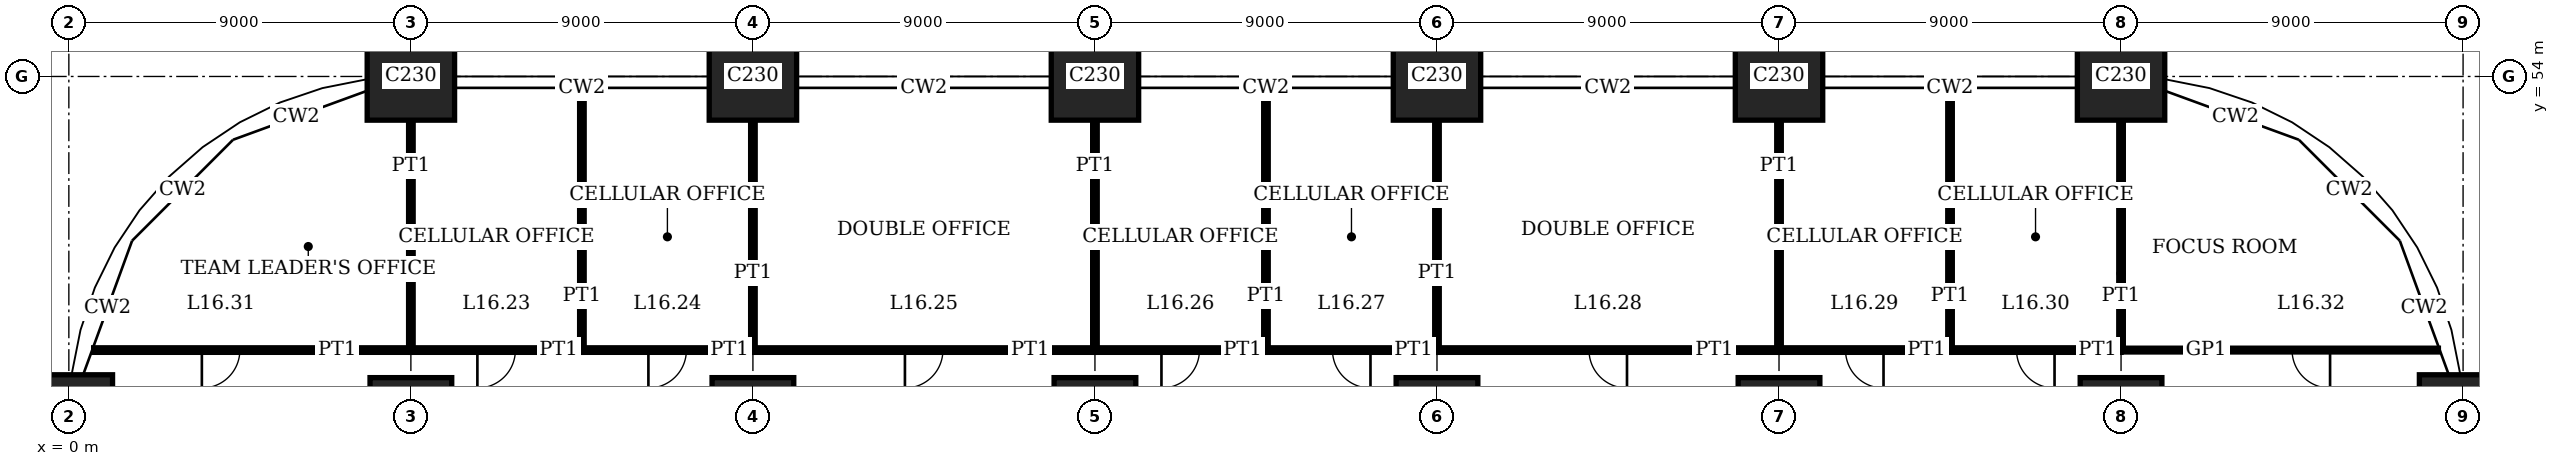
"""IFC4 building model, lengths in metres.
Left out: names, types, materials, properties, quantities, classifications, styles, units other than length and angle.
Written with IfcOpenShell. Run it as: python <this file> out.ifc"""

import sys

from ifc_helpers import new_model, si_unit, direction, frame, frame_2d, origin, origin_2d, place, context, subcontext, project, spatial, rectangle, extrude, element, fill, save


model = new_model("IFC4")
c1 = context("Model", 3, precision=1e-05, world=origin(), true_north=direction((0.0, 1.0)))
c2 = subcontext(c1, "Body", "Model", "MODEL_VIEW")
j1 = project(units=[si_unit("LENGTHUNIT", "METRE"), si_unit("PLANEANGLEUNIT", "RADIAN")], contexts=[c1])
p1 = place(None, origin())
s1 = spatial("IfcSite", under=j1, at=p1, CompositionType="ELEMENT")
p2 = place(p1, origin())
s2 = spatial("IfcBuilding", under=s1, at=p2, CompositionType="ELEMENT")
p3 = place(p2, frame((0.0, 0.0, 67.8)))
s3 = spatial("IfcBuildingStorey", under=s2, at=p3, CompositionType="ELEMENT", Elevation=67.8)
p4 = place(p3, frame((0.0, 45.0, 0.0), z_axis=(0.0, 0.0, 1.0), x_axis=(1.0, 0.0, 0.0)))
e1 = element("IfcColumn", 1, at=p4, inside=s3, PredefinedType="COLUMN", context=c2, shape_type="SweptSolid", body=[
    extrude(rectangle(XDim=2.3, YDim=2.3, at=origin_2d()), origin(), (0.0, 0.0, 1.0), 4.0),
])
p5 = place(p3, frame((9.0, 45.0, 0.0), z_axis=(0.0, 0.0, 1.0), x_axis=(1.0, 0.0, 0.0)))
e2 = element("IfcColumn", 2, at=p5, inside=s3, PredefinedType="COLUMN", context=c2, shape_type="SweptSolid", body=[
    extrude(rectangle(XDim=2.15, YDim=2.15, at=origin_2d()), origin(), (0.0, 0.0, 1.0), 4.0),
])
p6 = place(p3, frame((9.0, 54.0, 0.0), z_axis=(0.0, 0.0, 1.0), x_axis=(1.0, 0.0, 0.0)))
e3 = element("IfcColumn", 3, at=p6, inside=s3, PredefinedType="COLUMN", context=c2, shape_type="SweptSolid", body=[
    extrude(rectangle(XDim=2.3, YDim=2.3, at=origin_2d()), origin(), (0.0, 0.0, 1.0), 4.0),
])
p7 = place(p3, frame((18.0, 45.0, 0.0), z_axis=(0.0, 0.0, 1.0), x_axis=(1.0, 0.0, 0.0)))
e4 = element("IfcColumn", 4, at=p7, inside=s3, PredefinedType="COLUMN", context=c2, shape_type="SweptSolid", body=[
    extrude(rectangle(XDim=2.15, YDim=2.15, at=origin_2d()), origin(), (0.0, 0.0, 1.0), 4.0),
])
p8 = place(p3, frame((18.0, 54.0, 0.0), z_axis=(0.0, 0.0, 1.0), x_axis=(1.0, 0.0, 0.0)))
e5 = element("IfcColumn", 5, at=p8, inside=s3, PredefinedType="COLUMN", context=c2, shape_type="SweptSolid", body=[
    extrude(rectangle(XDim=2.3, YDim=2.3, at=origin_2d()), origin(), (0.0, 0.0, 1.0), 4.0),
])
p9 = place(p3, frame((27.0, 45.0, 0.0), z_axis=(0.0, 0.0, 1.0), x_axis=(1.0, 0.0, 0.0)))
e6 = element("IfcColumn", 6, at=p9, inside=s3, PredefinedType="COLUMN", context=c2, shape_type="SweptSolid", body=[
    extrude(rectangle(XDim=2.15, YDim=2.15, at=origin_2d()), origin(), (0.0, 0.0, 1.0), 4.0),
])
p10 = place(p3, frame((27.0, 54.0, 0.0), z_axis=(0.0, 0.0, 1.0), x_axis=(1.0, 0.0, 0.0)))
e7 = element("IfcColumn", 7, at=p10, inside=s3, PredefinedType="COLUMN", context=c2, shape_type="SweptSolid", body=[
    extrude(rectangle(XDim=2.3, YDim=2.3, at=origin_2d()), origin(), (0.0, 0.0, 1.0), 4.0),
])
p11 = place(p3, frame((36.0, 45.0, 0.0), z_axis=(0.0, 0.0, 1.0), x_axis=(1.0, 0.0, 0.0)))
e8 = element("IfcColumn", 8, at=p11, inside=s3, PredefinedType="COLUMN", context=c2, shape_type="SweptSolid", body=[
    extrude(rectangle(XDim=2.15, YDim=2.15, at=origin_2d()), origin(), (0.0, 0.0, 1.0), 4.0),
])
p12 = place(p3, frame((36.0, 54.0, 0.0), z_axis=(0.0, 0.0, 1.0), x_axis=(1.0, 0.0, 0.0)))
e9 = element("IfcColumn", 9, at=p12, inside=s3, PredefinedType="COLUMN", context=c2, shape_type="SweptSolid", body=[
    extrude(rectangle(XDim=2.3, YDim=2.3, at=origin_2d()), origin(), (0.0, 0.0, 1.0), 4.0),
])
p13 = place(p3, frame((45.0, 45.0, 0.0), z_axis=(0.0, 0.0, 1.0), x_axis=(1.0, 0.0, 0.0)))
e10 = element("IfcColumn", 10, at=p13, inside=s3, PredefinedType="COLUMN", context=c2, shape_type="SweptSolid", body=[
    extrude(rectangle(XDim=2.15, YDim=2.15, at=origin_2d()), origin(), (0.0, 0.0, 1.0), 4.0),
])
p14 = place(p3, frame((45.0, 54.0, 0.0), z_axis=(0.0, 0.0, 1.0), x_axis=(1.0, 0.0, 0.0)))
e11 = element("IfcColumn", 11, at=p14, inside=s3, PredefinedType="COLUMN", context=c2, shape_type="SweptSolid", body=[
    extrude(rectangle(XDim=2.3, YDim=2.3, at=origin_2d()), origin(), (0.0, 0.0, 1.0), 4.0),
])
p15 = place(p3, frame((54.0, 45.0, 0.0), z_axis=(0.0, 0.0, 1.0), x_axis=(1.0, 0.0, 0.0)))
e12 = element("IfcColumn", 12, at=p15, inside=s3, PredefinedType="COLUMN", context=c2, shape_type="SweptSolid", body=[
    extrude(rectangle(XDim=2.15, YDim=2.15, at=origin_2d()), origin(), (0.0, 0.0, 1.0), 4.0),
])
for number, where, z_axis, x_axis in (
    (13, (54.0, 54.0, 0.0), (0.0, 0.0, 1.0), (1.0, 0.0, 0.0)),
    (14, (63.0, 45.0, 0.0), (0.0, 0.0, 1.0), (1.0, 0.0, 0.0)),
):
    element("IfcColumn", number, at=place(p3, frame(where, z_axis=z_axis, x_axis=x_axis)), inside=s3, PredefinedType="COLUMN", context=c2, shape_type="SweptSolid", body=[
        extrude(rectangle(XDim=2.3, YDim=2.3, at=origin_2d()), origin(), (0.0, 0.0, 1.0), 4.0),
    ])
p16 = place(p3, frame((9.0, 46.8, 0.0), z_axis=(0.0, 0.0, 1.0), x_axis=(1.0, 0.0, 0.0)))
e15 = element("IfcWall", 15, at=p16, inside=s3, PredefinedType="PARTITIONING", context=c2, shape_type="SweptSolid", body=[
    extrude(rectangle(XDim=4.5, YDim=0.12, at=frame_2d((2.25, 0.0))), origin(), (0.0, 0.0, 1.0), 3.75),
])
p17 = place(p16, frame((1.75, 0.0, 0.0)))
e16 = element("IfcOpeningElement", 16, at=p17, cuts=e15, PredefinedType="OPENING", context=c2, shape_type="SweptSolid", body=[
    extrude(rectangle(XDim=1.0, YDim=2.4, at=frame_2d((0.5, 1.2))), frame((0.0, 0.07, 0.0), z_axis=(0.0, -1.0, 0.0), x_axis=(1.0, 0.0, 0.0)), (0.0, 0.0, 1.0), 0.14),
])
p18 = place(p3, frame((13.5, 46.8, 0.0), z_axis=(0.0, 0.0, 1.0), x_axis=(1.0, 0.0, 0.0)))
e17 = element("IfcWall", 17, at=p18, inside=s3, PredefinedType="PARTITIONING", context=c2, shape_type="SweptSolid", body=[
    extrude(rectangle(XDim=4.5, YDim=0.12, at=frame_2d((2.25, 0.0))), origin(), (0.0, 0.0, 1.0), 3.75),
])
p19 = place(p18, frame((1.75, 0.0, 0.0)))
e18 = element("IfcOpeningElement", 18, at=p19, cuts=e17, PredefinedType="OPENING", context=c2, shape_type="SweptSolid", body=[
    extrude(rectangle(XDim=1.0, YDim=2.4, at=frame_2d((0.5, 1.2))), frame((0.0, 0.07, 0.0), z_axis=(0.0, -1.0, 0.0), x_axis=(1.0, 0.0, 0.0)), (0.0, 0.0, 1.0), 0.14),
])
p20 = place(p3, frame((18.0, 46.8, 0.0), z_axis=(0.0, 0.0, 1.0), x_axis=(1.0, 0.0, 0.0)))
e19 = element("IfcWall", 19, at=p20, inside=s3, PredefinedType="PARTITIONING", context=c2, shape_type="SweptSolid", body=[
    extrude(rectangle(XDim=9.0, YDim=0.12, at=frame_2d((4.5, 0.0))), origin(), (0.0, 0.0, 1.0), 3.75),
])
p21 = place(p20, frame((4.0, 0.0, 0.0)))
e20 = element("IfcOpeningElement", 20, at=p21, cuts=e19, PredefinedType="OPENING", context=c2, shape_type="SweptSolid", body=[
    extrude(rectangle(XDim=1.0, YDim=2.4, at=frame_2d((0.5, 1.2))), frame((0.0, 0.07, 0.0), z_axis=(0.0, -1.0, 0.0), x_axis=(1.0, 0.0, 0.0)), (0.0, 0.0, 1.0), 0.14),
])
p22 = place(p3, frame((27.0, 46.8, 0.0), z_axis=(0.0, 0.0, 1.0), x_axis=(1.0, 0.0, 0.0)))
e21 = element("IfcWall", 21, at=p22, inside=s3, PredefinedType="PARTITIONING", context=c2, shape_type="SweptSolid", body=[
    extrude(rectangle(XDim=4.5, YDim=0.12, at=frame_2d((2.25, 0.0))), origin(), (0.0, 0.0, 1.0), 3.75),
])
p23 = place(p22, frame((1.75, 0.0, 0.0)))
e22 = element("IfcOpeningElement", 22, at=p23, cuts=e21, PredefinedType="OPENING", context=c2, shape_type="SweptSolid", body=[
    extrude(rectangle(XDim=1.0, YDim=2.4, at=frame_2d((0.5, 1.2))), frame((0.0, 0.07, 0.0), z_axis=(0.0, -1.0, 0.0), x_axis=(1.0, 0.0, 0.0)), (0.0, 0.0, 1.0), 0.14),
])
p24 = place(p3, frame((31.5, 46.8, 0.0), z_axis=(0.0, 0.0, 1.0), x_axis=(1.0, 0.0, 0.0)))
e23 = element("IfcWall", 23, at=p24, inside=s3, PredefinedType="PARTITIONING", context=c2, shape_type="SweptSolid", body=[
    extrude(rectangle(XDim=4.5, YDim=0.12, at=frame_2d((2.25, 0.0))), origin(), (0.0, 0.0, 1.0), 3.75),
])
p25 = place(p24, frame((1.75, 0.0, 0.0)))
e24 = element("IfcOpeningElement", 24, at=p25, cuts=e23, PredefinedType="OPENING", context=c2, shape_type="SweptSolid", body=[
    extrude(rectangle(XDim=1.0, YDim=2.4, at=frame_2d((0.5, 1.2))), frame((0.0, 0.07, 0.0), z_axis=(0.0, -1.0, 0.0), x_axis=(1.0, 0.0, 0.0)), (0.0, 0.0, 1.0), 0.14),
])
p26 = place(p3, frame((36.0, 46.8, 0.0), z_axis=(0.0, 0.0, 1.0), x_axis=(1.0, 0.0, 0.0)))
e25 = element("IfcWall", 25, at=p26, inside=s3, PredefinedType="PARTITIONING", context=c2, shape_type="SweptSolid", body=[
    extrude(rectangle(XDim=9.0, YDim=0.12, at=frame_2d((4.5, 0.0))), origin(), (0.0, 0.0, 1.0), 3.75),
])
p27 = place(p26, frame((4.0, 0.0, 0.0)))
e26 = element("IfcOpeningElement", 26, at=p27, cuts=e25, PredefinedType="OPENING", context=c2, shape_type="SweptSolid", body=[
    extrude(rectangle(XDim=1.0, YDim=2.4, at=frame_2d((0.5, 1.2))), frame((0.0, 0.07, 0.0), z_axis=(0.0, -1.0, 0.0), x_axis=(1.0, 0.0, 0.0)), (0.0, 0.0, 1.0), 0.14),
])
p28 = place(p3, frame((45.0, 46.8, 0.0), z_axis=(0.0, 0.0, 1.0), x_axis=(1.0, 0.0, 0.0)))
e27 = element("IfcWall", 27, at=p28, inside=s3, PredefinedType="PARTITIONING", context=c2, shape_type="SweptSolid", body=[
    extrude(rectangle(XDim=4.5, YDim=0.12, at=frame_2d((2.25, 0.0))), origin(), (0.0, 0.0, 1.0), 3.75),
])
p29 = place(p28, frame((1.75, 0.0, 0.0)))
e28 = element("IfcOpeningElement", 28, at=p29, cuts=e27, PredefinedType="OPENING", context=c2, shape_type="SweptSolid", body=[
    extrude(rectangle(XDim=1.0, YDim=2.4, at=frame_2d((0.5, 1.2))), frame((0.0, 0.07, 0.0), z_axis=(0.0, -1.0, 0.0), x_axis=(1.0, 0.0, 0.0)), (0.0, 0.0, 1.0), 0.14),
])
p30 = place(p3, frame((49.5, 46.8, 0.0), z_axis=(0.0, 0.0, 1.0), x_axis=(1.0, 0.0, 0.0)))
e29 = element("IfcWall", 29, at=p30, inside=s3, PredefinedType="PARTITIONING", context=c2, shape_type="SweptSolid", body=[
    extrude(rectangle(XDim=4.5, YDim=0.12, at=frame_2d((2.25, 0.0))), origin(), (0.0, 0.0, 1.0), 3.75),
])
p31 = place(p30, frame((1.75, 0.0, 0.0)))
e30 = element("IfcOpeningElement", 30, at=p31, cuts=e29, PredefinedType="OPENING", context=c2, shape_type="SweptSolid", body=[
    extrude(rectangle(XDim=1.0, YDim=2.4, at=frame_2d((0.5, 1.2))), frame((0.0, 0.07, 0.0), z_axis=(0.0, -1.0, 0.0), x_axis=(1.0, 0.0, 0.0)), (0.0, 0.0, 1.0), 0.14),
])
p32 = place(p3, frame((0.653, 46.8, 0.0), z_axis=(0.0, 0.0, 1.0), x_axis=(1.0, 0.0, 0.0)))
e31 = element("IfcWall", 31, at=p32, inside=s3, PredefinedType="PARTITIONING", context=c2, shape_type="SweptSolid", body=[
    extrude(rectangle(XDim=8.347, YDim=0.12, at=frame_2d((4.174, 0.0))), origin(), (0.0, 0.0, 1.0), 3.75),
])
p33 = place(p32, frame((2.847, 0.0, 0.0)))
e32 = element("IfcOpeningElement", 32, at=p33, cuts=e31, PredefinedType="OPENING", context=c2, shape_type="SweptSolid", body=[
    extrude(rectangle(XDim=1.0, YDim=2.4, at=frame_2d((0.5, 1.2))), frame((0.0, 0.07, 0.0), z_axis=(0.0, -1.0, 0.0), x_axis=(1.0, 0.0, 0.0)), (0.0, 0.0, 1.0), 0.14),
])
p34 = place(p3, frame((54.0, 46.8, 0.0), z_axis=(0.0, 0.0, 1.0), x_axis=(1.0, 0.0, 0.0)))
e33 = element("IfcWall", 33, at=p34, inside=s3, PredefinedType="PARTITIONING", context=c2, shape_type="SweptSolid", body=[
    extrude(rectangle(XDim=8.351, YDim=0.1, at=frame_2d((4.175, 0.0))), origin(), (0.0, 0.0, 1.0), 3.75),
])
p35 = place(p34, frame((4.5, 0.0, 0.0)))
e34 = element("IfcOpeningElement", 34, at=p35, cuts=e33, PredefinedType="OPENING", context=c2, shape_type="SweptSolid", body=[
    extrude(rectangle(XDim=1.0, YDim=2.4, at=frame_2d((0.5, 1.2))), frame((0.0, 0.06, 0.0), z_axis=(0.0, -1.0, 0.0), x_axis=(1.0, 0.0, 0.0)), (0.0, 0.0, 1.0), 0.12),
])
p36 = place(p3, frame((9.0, 46.8, 0.0), z_axis=(0.0, 0.0, 1.0), x_axis=(0.0, 1.0, 0.0)))
e35 = element("IfcWall", 35, at=p36, inside=s3, PredefinedType="PARTITIONING", context=c2, shape_type="SweptSolid", body=[
    extrude(rectangle(XDim=6.05, YDim=0.12, at=frame_2d((3.025, 0.0))), origin(), (0.0, 0.0, 1.0), 3.05),
])
p37 = place(p3, frame((13.5, 46.8, 0.0), z_axis=(0.0, 0.0, 1.0), x_axis=(0.0, 1.0, 0.0)))
e36 = element("IfcWall", 36, at=p37, inside=s3, PredefinedType="PARTITIONING", context=c2, shape_type="SweptSolid", body=[
    extrude(rectangle(XDim=6.89, YDim=0.12, at=frame_2d((3.445, 0.0))), origin(), (0.0, 0.0, 1.0), 3.75),
])
for number, where, z_axis, x_axis in (
    (37, (18.0, 46.8, 0.0), (0.0, 0.0, 1.0), (0.0, 1.0, 0.0)),
    (38, (27.0, 46.8, 0.0), (0.0, 0.0, 1.0), (0.0, 1.0, 0.0)),
):
    element("IfcWall", number, at=place(p3, frame(where, z_axis=z_axis, x_axis=x_axis)), inside=s3, PredefinedType="PARTITIONING", context=c2, shape_type="SweptSolid", body=[
        extrude(rectangle(XDim=6.05, YDim=0.12, at=frame_2d((3.025, 0.0))), origin(), (0.0, 0.0, 1.0), 3.05),
    ])
p38 = place(p3, frame((31.5, 46.8, 0.0), z_axis=(0.0, 0.0, 1.0), x_axis=(0.0, 1.0, 0.0)))
e39 = element("IfcWall", 39, at=p38, inside=s3, PredefinedType="PARTITIONING", context=c2, shape_type="SweptSolid", body=[
    extrude(rectangle(XDim=6.89, YDim=0.12, at=frame_2d((3.445, 0.0))), origin(), (0.0, 0.0, 1.0), 3.75),
])
for number, where, z_axis, x_axis in (
    (40, (36.0, 46.8, 0.0), (0.0, 0.0, 1.0), (0.0, 1.0, 0.0)),
    (41, (45.0, 46.8, 0.0), (0.0, 0.0, 1.0), (0.0, 1.0, 0.0)),
):
    element("IfcWall", number, at=place(p3, frame(where, z_axis=z_axis, x_axis=x_axis)), inside=s3, PredefinedType="PARTITIONING", context=c2, shape_type="SweptSolid", body=[
        extrude(rectangle(XDim=6.05, YDim=0.12, at=frame_2d((3.025, 0.0))), origin(), (0.0, 0.0, 1.0), 3.05),
    ])
p39 = place(p3, frame((49.5, 46.8, 0.0), z_axis=(0.0, 0.0, 1.0), x_axis=(0.0, 1.0, 0.0)))
e42 = element("IfcWall", 42, at=p39, inside=s3, PredefinedType="PARTITIONING", context=c2, shape_type="SweptSolid", body=[
    extrude(rectangle(XDim=6.89, YDim=0.12, at=frame_2d((3.445, 0.0))), origin(), (0.0, 0.0, 1.0), 3.75),
])
p40 = place(p3, frame((54.0, 46.8, 0.0), z_axis=(0.0, 0.0, 1.0), x_axis=(0.0, 1.0, 0.0)))
e43 = element("IfcWall", 43, at=p40, inside=s3, PredefinedType="PARTITIONING", context=c2, shape_type="SweptSolid", body=[
    extrude(rectangle(XDim=6.05, YDim=0.12, at=frame_2d((3.025, 0.0))), origin(), (0.0, 0.0, 1.0), 3.05),
])
p41 = place(p17, origin())
e44 = element("IfcDoor", 44, at=p41, inside=s3, OperationType="SINGLE_SWING_LEFT", PredefinedType="DOOR", context=c2, shape_type="SweptSolid", body=[
    extrude(rectangle(XDim=1.0, YDim=2.4, at=frame_2d((0.5, 1.2))), frame((0.0, 0.025, 0.0), z_axis=(0.0, -1.0, 0.0), x_axis=(1.0, 0.0, 0.0)), (0.0, 0.0, 1.0), 0.05),
])
fill(e16, e44)
p42 = place(p19, origin())
e45 = element("IfcDoor", 45, at=p42, inside=s3, OperationType="SINGLE_SWING_LEFT", PredefinedType="DOOR", context=c2, shape_type="SweptSolid", body=[
    extrude(rectangle(XDim=1.0, YDim=2.4, at=frame_2d((0.5, 1.2))), frame((0.0, 0.025, 0.0), z_axis=(0.0, -1.0, 0.0), x_axis=(1.0, 0.0, 0.0)), (0.0, 0.0, 1.0), 0.05),
])
fill(e18, e45)
p43 = place(p21, origin())
e46 = element("IfcDoor", 46, at=p43, inside=s3, OperationType="SINGLE_SWING_LEFT", PredefinedType="DOOR", context=c2, shape_type="SweptSolid", body=[
    extrude(rectangle(XDim=1.0, YDim=2.4, at=frame_2d((0.5, 1.2))), frame((0.0, 0.025, 0.0), z_axis=(0.0, -1.0, 0.0), x_axis=(1.0, 0.0, 0.0)), (0.0, 0.0, 1.0), 0.05),
])
fill(e20, e46)
p44 = place(p23, origin())
e47 = element("IfcDoor", 47, at=p44, inside=s3, OperationType="SINGLE_SWING_LEFT", PredefinedType="DOOR", context=c2, shape_type="SweptSolid", body=[
    extrude(rectangle(XDim=1.0, YDim=2.4, at=frame_2d((0.5, 1.2))), frame((0.0, 0.025, 0.0), z_axis=(0.0, -1.0, 0.0), x_axis=(1.0, 0.0, 0.0)), (0.0, 0.0, 1.0), 0.05),
])
fill(e22, e47)
p45 = place(p25, origin())
e48 = element("IfcDoor", 48, at=p45, inside=s3, OperationType="SINGLE_SWING_RIGHT", PredefinedType="DOOR", context=c2, shape_type="SweptSolid", body=[
    extrude(rectangle(XDim=1.0, YDim=2.4, at=frame_2d((0.5, 1.2))), frame((0.0, 0.025, 0.0), z_axis=(0.0, -1.0, 0.0), x_axis=(1.0, 0.0, 0.0)), (0.0, 0.0, 1.0), 0.05),
])
fill(e24, e48)
p46 = place(p27, origin())
e49 = element("IfcDoor", 49, at=p46, inside=s3, OperationType="SINGLE_SWING_RIGHT", PredefinedType="DOOR", context=c2, shape_type="SweptSolid", body=[
    extrude(rectangle(XDim=1.0, YDim=2.4, at=frame_2d((0.5, 1.2))), frame((0.0, 0.025, 0.0), z_axis=(0.0, -1.0, 0.0), x_axis=(1.0, 0.0, 0.0)), (0.0, 0.0, 1.0), 0.05),
])
fill(e26, e49)
p47 = place(p29, origin())
e50 = element("IfcDoor", 50, at=p47, inside=s3, OperationType="SINGLE_SWING_RIGHT", PredefinedType="DOOR", context=c2, shape_type="SweptSolid", body=[
    extrude(rectangle(XDim=1.0, YDim=2.4, at=frame_2d((0.5, 1.2))), frame((0.0, 0.025, 0.0), z_axis=(0.0, -1.0, 0.0), x_axis=(1.0, 0.0, 0.0)), (0.0, 0.0, 1.0), 0.05),
])
fill(e28, e50)
p48 = place(p31, origin())
e51 = element("IfcDoor", 51, at=p48, inside=s3, OperationType="SINGLE_SWING_RIGHT", PredefinedType="DOOR", context=c2, shape_type="SweptSolid", body=[
    extrude(rectangle(XDim=1.0, YDim=2.4, at=frame_2d((0.5, 1.2))), frame((0.0, 0.025, 0.0), z_axis=(0.0, -1.0, 0.0), x_axis=(1.0, 0.0, 0.0)), (0.0, 0.0, 1.0), 0.05),
])
fill(e30, e51)
p49 = place(p33, origin())
e52 = element("IfcDoor", 52, at=p49, inside=s3, OperationType="SINGLE_SWING_LEFT", PredefinedType="DOOR", context=c2, shape_type="SweptSolid", body=[
    extrude(rectangle(XDim=1.0, YDim=2.4, at=frame_2d((0.5, 1.2))), frame((0.0, 0.025, 0.0), z_axis=(0.0, -1.0, 0.0), x_axis=(1.0, 0.0, 0.0)), (0.0, 0.0, 1.0), 0.05),
])
fill(e32, e52)
p50 = place(p35, origin())
e53 = element("IfcDoor", 53, at=p50, inside=s3, OperationType="SINGLE_SWING_RIGHT", PredefinedType="DOOR", context=c2, shape_type="SweptSolid", body=[
    extrude(rectangle(XDim=1.0, YDim=2.4, at=frame_2d((0.5, 1.2))), frame((0.0, 0.02, 0.0), z_axis=(0.0, -1.0, 0.0), x_axis=(1.0, 0.0, 0.0)), (0.0, 0.0, 1.0), 0.04),
])
fill(e34, e53)
save(model, sys.argv[1])
